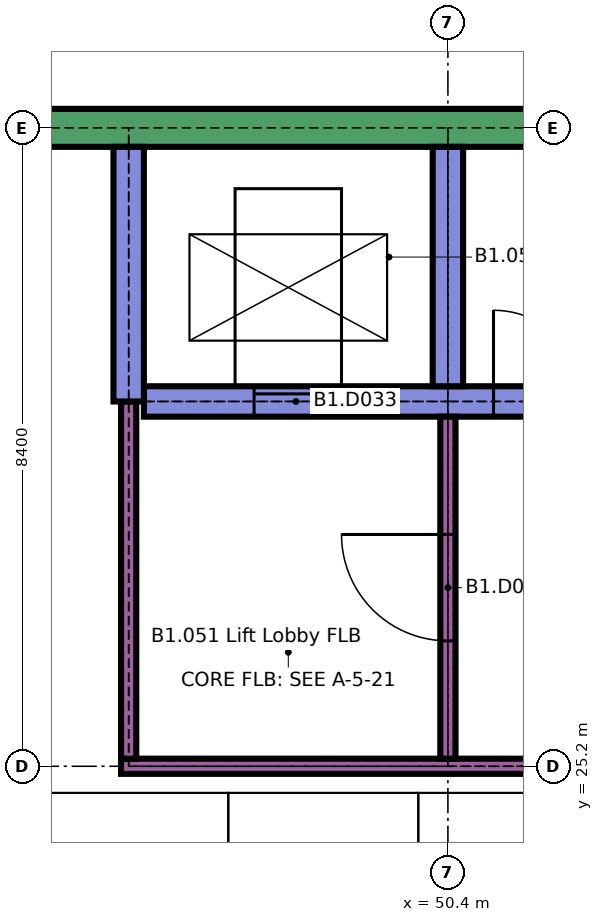
"""IFC4 building model, lengths in metres.
Left out: names, types, materials, properties, quantities, classifications, styles, units other than length and angle.
Written with IfcOpenShell. Run it as: python <this file> out.ifc"""

import sys

from ifc_helpers import new_model, si_unit, direction, frame, frame_2d, origin, place, context, subcontext, project, spatial, rectangle, extrude, element, fill, save


model = new_model("IFC4")
c1 = context("Model", 3, precision=1e-05, world=origin(), true_north=direction((0.0, 1.0)))
c2 = subcontext(c1, "Body", "Model", "MODEL_VIEW")
j1 = project(units=[si_unit("LENGTHUNIT", "METRE"), si_unit("PLANEANGLEUNIT", "RADIAN")], contexts=[c1])
p1 = place(None, origin())
s1 = spatial("IfcSite", under=j1, at=p1, CompositionType="ELEMENT")
p2 = place(p1, origin())
s2 = spatial("IfcBuilding", under=s1, at=p2, CompositionType="ELEMENT")
p3 = place(p2, frame((0.0, 0.0, -4.2)))
s3 = spatial("IfcBuildingStorey", under=s2, at=p3, CompositionType="ELEMENT", Elevation=-4.2)
p4 = place(p3, frame((42.45, 33.6, 0.0), z_axis=(0.0, 0.0, 1.0), x_axis=(1.0, 0.0, 0.0)))
e1 = element("IfcWall", 1, at=p4, inside=s3, PredefinedType="SOLIDWALL", context=c2, shape_type="SweptSolid", body=[
    extrude(rectangle(XDim=41.1, YDim=0.5, at=frame_2d((20.55, 0.0))), origin(), (0.0, 0.0, 1.0), 3.75),
])
p5 = place(p3, frame((46.1, 25.2, 0.0), z_axis=(0.0, 0.0, 1.0), x_axis=(1.0, 0.0, 0.0)))
e2 = element("IfcWall", 2, at=p5, inside=s3, PredefinedType="PARTITIONING", context=c2, shape_type="SweptSolid", body=[
    extrude(rectangle(XDim=12.7, YDim=0.2, at=frame_2d((6.35, 0.0))), origin(), (0.0, 0.0, 1.0), 3.75),
])
p6 = place(p5, frame((7.8, 0.0, 0.0)))
e3 = element("IfcOpeningElement", 3, at=p6, cuts=e2, PredefinedType="OPENING", context=c2, shape_type="SweptSolid", body=[
    extrude(rectangle(XDim=1.4, YDim=2.1, at=frame_2d((0.7, 1.05))), frame((0.0, 0.11, 0.0), z_axis=(0.0, -1.0, 0.0), x_axis=(1.0, 0.0, 0.0)), (0.0, 0.0, 1.0), 0.22),
])
p7 = place(p3, frame((46.4, 30.0, 0.0), z_axis=(0.0, 0.0, 1.0), x_axis=(1.0, 0.0, 0.0)))
e4 = element("IfcWall", 4, at=p7, inside=s3, PredefinedType="SHEAR", context=c2, shape_type="SweptSolid", body=[
    extrude(rectangle(XDim=12.2, YDim=0.4, at=frame_2d((6.1, 0.0))), origin(), (0.0, 0.0, 1.0), 3.75),
])
p8 = place(p7, frame((1.45, 0.0, 0.0)))
e5 = element("IfcOpeningElement", 5, at=p8, cuts=e4, PredefinedType="OPENING", context=c2, shape_type="SweptSolid", body=[
    extrude(rectangle(XDim=1.1, YDim=2.1, at=frame_2d((0.55, 1.05))), frame((0.0, 0.21, 0.0), z_axis=(0.0, -1.0, 0.0), x_axis=(1.0, 0.0, 0.0)), (0.0, 0.0, 1.0), 0.42),
])
p9 = place(p7, frame((4.6, 0.0, 0.0)))
e6 = element("IfcOpeningElement", 6, at=p9, cuts=e4, PredefinedType="OPENING", context=c2, shape_type="SweptSolid", body=[
    extrude(rectangle(XDim=1.2, YDim=2.1, at=frame_2d((0.6, 1.05))), frame((0.0, 0.21, 0.0), z_axis=(0.0, -1.0, 0.0), x_axis=(1.0, 0.0, 0.0)), (0.0, 0.0, 1.0), 0.42),
])
p10 = place(p3, frame((46.2, 25.3, 0.0), z_axis=(0.0, 0.0, 1.0), x_axis=(0.0, 1.0, 0.0)))
e7 = element("IfcWall", 7, at=p10, inside=s3, PredefinedType="PARTITIONING", context=c2, shape_type="SweptSolid", body=[
    extrude(rectangle(XDim=4.7, YDim=0.2, at=frame_2d((2.35, 0.0))), origin(), (0.0, 0.0, 1.0), 3.75),
])
p11 = place(p3, frame((46.2, 30.0, 0.0), z_axis=(0.0, 0.0, 1.0), x_axis=(0.0, 1.0, 0.0)))
e8 = element("IfcWall", 8, at=p11, inside=s3, PredefinedType="SHEAR", context=c2, shape_type="SweptSolid", body=[
    extrude(rectangle(XDim=3.35, YDim=0.4, at=frame_2d((1.675, 0.0))), origin(), (0.0, 0.0, 1.0), 3.75),
])
p12 = place(p3, frame((50.4, 25.3, 0.0), z_axis=(0.0, 0.0, 1.0), x_axis=(0.0, 1.0, 0.0)))
e9 = element("IfcWall", 9, at=p12, inside=s3, PredefinedType="PARTITIONING", context=c2, shape_type="SweptSolid", body=[
    extrude(rectangle(XDim=4.5, YDim=0.2, at=frame_2d((2.25, 0.0))), origin(), (0.0, 0.0, 1.0), 3.75),
])
p13 = place(p12, frame((1.55, 0.0, 0.0)))
e10 = element("IfcOpeningElement", 10, at=p13, cuts=e9, PredefinedType="OPENING", context=c2, shape_type="SweptSolid", body=[
    extrude(rectangle(XDim=1.4, YDim=2.1, at=frame_2d((0.7, 1.05))), frame((0.0, 0.11, 0.0), z_axis=(0.0, -1.0, 0.0), x_axis=(1.0, 0.0, 0.0)), (0.0, 0.0, 1.0), 0.22),
])
p14 = place(p3, frame((50.4, 30.2, 0.0), z_axis=(0.0, 0.0, 1.0), x_axis=(0.0, 1.0, 0.0)))
e11 = element("IfcWall", 11, at=p14, inside=s3, PredefinedType="SHEAR", context=c2, shape_type="SweptSolid", body=[
    extrude(rectangle(XDim=3.15, YDim=0.4, at=frame_2d((1.575, 0.0))), origin(), (0.0, 0.0, 1.0), 3.75),
])
p15 = place(p8, origin())
e12 = element("IfcDoor", 12, at=p15, inside=s3, OperationType="SLIDING_TO_LEFT", PredefinedType="DOOR", context=c2, shape_type="SweptSolid", body=[
    extrude(rectangle(XDim=1.1, YDim=2.1, at=frame_2d((0.55, 1.05))), frame((0.0, 0.025, 0.0), z_axis=(0.0, -1.0, 0.0), x_axis=(1.0, 0.0, 0.0)), (0.0, 0.0, 1.0), 0.05),
])
fill(e5, e12)
p16 = place(p9, origin())
e13 = element("IfcDoor", 13, at=p16, inside=s3, OperationType="SINGLE_SWING_RIGHT", PredefinedType="DOOR", context=c2, shape_type="SweptSolid", body=[
    extrude(rectangle(XDim=1.2, YDim=2.1, at=frame_2d((0.6, 1.05))), frame((0.0, 0.025, 0.0), z_axis=(0.0, -1.0, 0.0), x_axis=(1.0, 0.0, 0.0)), (0.0, 0.0, 1.0), 0.05),
])
fill(e6, e13)
p17 = place(p13, origin())
e14 = element("IfcDoor", 14, at=p17, inside=s3, OperationType="SINGLE_SWING_LEFT", PredefinedType="DOOR", context=c2, shape_type="SweptSolid", body=[
    extrude(rectangle(XDim=1.4, YDim=2.1, at=frame_2d((0.7, 1.05))), frame((0.0, 0.025, 0.0), z_axis=(0.0, -1.0, 0.0), x_axis=(1.0, 0.0, 0.0)), (0.0, 0.0, 1.0), 0.05),
])
fill(e10, e14)
save(model, sys.argv[1])
